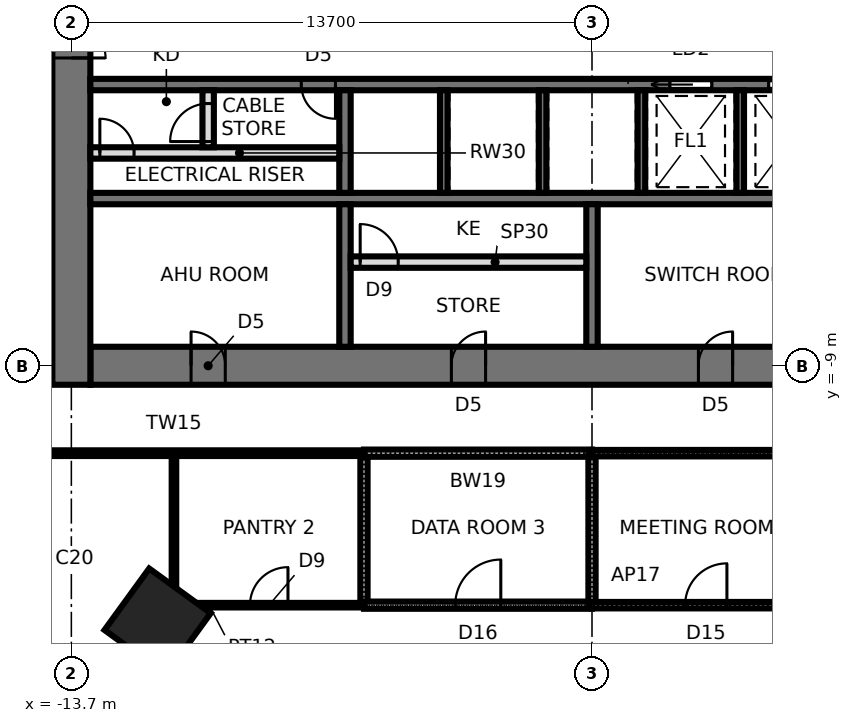
"""IFC4 building model, lengths in metres.
Left out: names, types, materials, properties, quantities, classifications, styles, units other than length and angle.
Written with IfcOpenShell. Run it as: python <this file> out.ifc"""

import sys

from ifc_helpers import new_model, si_unit, direction, frame, frame_2d, origin, origin_2d, place, context, subcontext, project, spatial, rectangle, extrude, element, fill, save


model = new_model("IFC4")
c1 = context("Model", 3, precision=1e-05, world=origin(), true_north=direction((0.0, 1.0)))
c2 = subcontext(c1, "Body", "Model", "MODEL_VIEW")
j1 = project(units=[si_unit("LENGTHUNIT", "METRE"), si_unit("PLANEANGLEUNIT", "RADIAN")], contexts=[c1])
p1 = place(None, origin())
s1 = spatial("IfcSite", under=j1, at=p1, CompositionType="ELEMENT")
p2 = place(p1, origin())
s2 = spatial("IfcBuilding", under=s1, at=p2, CompositionType="ELEMENT")
p3 = place(p2, frame((0.0, 0.0, 44.8)))
s3 = spatial("IfcBuildingStorey", under=s2, at=p3, CompositionType="ELEMENT", Elevation=44.8)
p4 = place(p3, frame((-11.43, -15.733, 0.0), z_axis=(0.0, 0.0, 1.0), x_axis=(-0.587785252292, -0.809016994375, 0.0)))
e1 = element("IfcColumn", 1, at=p4, inside=s3, PredefinedType="COLUMN", context=c2, shape_type="SweptSolid", body=[
    extrude(rectangle(XDim=2.0, YDim=2.0, at=origin_2d()), origin(), (0.0, 0.0, 1.0), 4.2),
])
p5 = place(p3, frame((-13.2, -9.0, 0.0), z_axis=(0.0, 0.0, 1.0), x_axis=(1.0, 0.0, 0.0)))
e2 = element("IfcWall", 2, at=p5, inside=s3, PredefinedType="SHEAR", context=c2, shape_type="SweptSolid", body=[
    extrude(rectangle(XDim=26.4, YDim=1.0, at=frame_2d((13.2, 0.0))), origin(), (0.0, 0.0, 1.0), 4.2),
])
p6 = place(p5, frame((2.65, 0.0, 0.0)))
e3 = element("IfcOpeningElement", 3, at=p6, cuts=e2, PredefinedType="OPENING", context=c2, shape_type="SweptSolid", body=[
    extrude(rectangle(XDim=0.9, YDim=2.1, at=frame_2d((0.45, 1.05))), frame((0.0, 0.51, 0.0), z_axis=(0.0, -1.0, 0.0), x_axis=(1.0, 0.0, 0.0)), (0.0, 0.0, 1.0), 1.02),
])
p7 = place(p5, frame((9.5, 0.0, 0.0)))
e4 = element("IfcOpeningElement", 4, at=p7, cuts=e2, PredefinedType="OPENING", context=c2, shape_type="SweptSolid", body=[
    extrude(rectangle(XDim=0.9, YDim=2.1, at=frame_2d((0.45, 1.05))), frame((0.0, 0.51, 0.0), z_axis=(0.0, -1.0, 0.0), x_axis=(1.0, 0.0, 0.0)), (0.0, 0.0, 1.0), 1.02),
])
p8 = place(p5, frame((16.0, 0.0, 0.0)))
e5 = element("IfcOpeningElement", 5, at=p8, cuts=e2, PredefinedType="OPENING", context=c2, shape_type="SweptSolid", body=[
    extrude(rectangle(XDim=0.9, YDim=2.1, at=frame_2d((0.45, 1.05))), frame((0.0, 0.51, 0.0), z_axis=(0.0, -1.0, 0.0), x_axis=(1.0, 0.0, 0.0)), (0.0, 0.0, 1.0), 1.02),
])
p9 = place(p5, frame((22.85, 0.0, 0.0)))
e6 = element("IfcOpeningElement", 6, at=p9, cuts=e2, PredefinedType="OPENING", context=c2, shape_type="SweptSolid", body=[
    extrude(rectangle(XDim=0.9, YDim=2.1, at=frame_2d((0.45, 1.05))), frame((0.0, 0.51, 0.0), z_axis=(0.0, -1.0, 0.0), x_axis=(1.0, 0.0, 0.0)), (0.0, 0.0, 1.0), 1.02),
])
p10 = place(p3, frame((-13.7, 9.5, 0.0), z_axis=(0.0, 0.0, 1.0), x_axis=(0.0, -1.0, 0.0)))
e7 = element("IfcWall", 7, at=p10, inside=s3, PredefinedType="SHEAR", context=c2, shape_type="SweptSolid", body=[
    extrude(rectangle(XDim=19.0, YDim=1.0, at=frame_2d((9.5, 0.0))), origin(), (0.0, 0.0, 1.0), 4.2),
])
p11 = place(p10, frame((8.6, 0.0, 0.0)))
e8 = element("IfcOpeningElement", 8, at=p11, cuts=e7, PredefinedType="OPENING", context=c2, shape_type="SweptSolid", body=[
    extrude(rectangle(XDim=1.8, YDim=2.4, at=frame_2d((0.9, 1.2))), frame((0.0, 0.51, 0.0), z_axis=(0.0, -1.0, 0.0), x_axis=(1.0, 0.0, 0.0)), (0.0, 0.0, 1.0), 1.02),
])
p12 = place(p3, frame((-13.2, -1.6, 0.0), z_axis=(0.0, 0.0, 1.0), x_axis=(1.0, 0.0, 0.0)))
e9 = element("IfcWall", 9, at=p12, inside=s3, PredefinedType="SHEAR", context=c2, shape_type="SweptSolid", body=[
    extrude(rectangle(XDim=26.4, YDim=0.3, at=frame_2d((13.2, 0.0))), origin(), (0.0, 0.0, 1.0), 4.2),
])
p13 = place(p12, frame((25.15, 0.0, 0.0)))
e10 = element("IfcOpeningElement", 10, at=p13, cuts=e9, PredefinedType="OPENING", context=c2, shape_type="SweptSolid", body=[
    extrude(rectangle(XDim=1.0, YDim=2.1, at=frame_2d((0.5, 1.05))), frame((0.0, 0.16, 0.0), z_axis=(0.0, -1.0, 0.0), x_axis=(1.0, 0.0, 0.0)), (0.0, 0.0, 1.0), 0.32),
])
p14 = place(p12, frame((15.25, 0.0, 0.0)))
e11 = element("IfcOpeningElement", 11, at=p14, cuts=e9, PredefinedType="OPENING", context=c2, shape_type="SweptSolid", body=[
    extrude(rectangle(XDim=1.1, YDim=2.3, at=frame_2d((0.55, 1.15))), frame((0.0, 0.16, 0.0), z_axis=(0.0, -1.0, 0.0), x_axis=(1.0, 0.0, 0.0)), (0.0, 0.0, 1.0), 0.32),
])
p15 = place(p12, frame((17.85, 0.0, 0.0)))
e12 = element("IfcOpeningElement", 12, at=p15, cuts=e9, PredefinedType="OPENING", context=c2, shape_type="SweptSolid", body=[
    extrude(rectangle(XDim=1.1, YDim=2.3, at=frame_2d((0.55, 1.15))), frame((0.0, 0.16, 0.0), z_axis=(0.0, -1.0, 0.0), x_axis=(1.0, 0.0, 0.0)), (0.0, 0.0, 1.0), 0.32),
])
p16 = place(p12, frame((5.55, 0.0, 0.0)))
e13 = element("IfcOpeningElement", 13, at=p16, cuts=e9, PredefinedType="OPENING", context=c2, shape_type="SweptSolid", body=[
    extrude(rectangle(XDim=0.9, YDim=2.1, at=frame_2d((0.45, 1.05))), frame((0.0, 0.16, 0.0), z_axis=(0.0, -1.0, 0.0), x_axis=(1.0, 0.0, 0.0)), (0.0, 0.0, 1.0), 0.32),
])
p17 = place(p3, frame((-13.2, -4.6, 0.0), z_axis=(0.0, 0.0, 1.0), x_axis=(1.0, 0.0, 0.0)))
e14 = element("IfcWall", 14, at=p17, inside=s3, PredefinedType="SHEAR", context=c2, shape_type="SweptSolid", body=[
    extrude(rectangle(XDim=26.4, YDim=0.3, at=frame_2d((13.2, 0.0))), origin(), (0.0, 0.0, 1.0), 4.2),
])
p18 = place(p3, frame((-6.5, -1.75, 0.0), z_axis=(0.0, 0.0, 1.0), x_axis=(0.0, -1.0, 0.0)))
e15 = element("IfcWall", 15, at=p18, inside=s3, PredefinedType="SHEAR", context=c2, shape_type="SweptSolid", body=[
    extrude(rectangle(XDim=2.7, YDim=0.3, at=frame_2d((1.35, 0.0))), origin(), (0.0, 0.0, 1.0), 4.2),
])
p19 = place(p3, frame((-6.5, -4.75, 0.0), z_axis=(0.0, 0.0, 1.0), x_axis=(0.0, -1.0, 0.0)))
e16 = element("IfcWall", 16, at=p19, inside=s3, PredefinedType="SHEAR", context=c2, shape_type="SweptSolid", body=[
    extrude(rectangle(XDim=3.75, YDim=0.3, at=frame_2d((1.875, 0.0))), origin(), (0.0, 0.0, 1.0), 4.2),
])
for number, where, z_axis, x_axis in (
    (17, (-3.9, -1.75, 0.0), (0.0, 0.0, 1.0), (0.0, -1.0, 0.0)),
    (18, (-1.3, -1.75, 0.0), (0.0, 0.0, 1.0), (0.0, -1.0, 0.0)),
    (19, (1.3, -1.75, 0.0), (0.0, 0.0, 1.0), (0.0, -1.0, 0.0)),
    (20, (3.9, -1.75, 0.0), (0.0, 0.0, 1.0), (0.0, -1.0, 0.0)),
):
    element("IfcWall", number, at=place(p3, frame(where, z_axis=z_axis, x_axis=x_axis)), inside=s3, PredefinedType="SHEAR", context=c2, shape_type="SweptSolid", body=[
        extrude(rectangle(XDim=2.7, YDim=0.2, at=frame_2d((1.35, 0.0))), origin(), (0.0, 0.0, 1.0), 4.2),
    ])
p20 = place(p3, frame((0.0, -4.75, 0.0), z_axis=(0.0, 0.0, 1.0), x_axis=(0.0, -1.0, 0.0)))
e21 = element("IfcWall", 21, at=p20, inside=s3, PredefinedType="SHEAR", context=c2, shape_type="SweptSolid", body=[
    extrude(rectangle(XDim=3.75, YDim=0.3, at=frame_2d((1.875, 0.0))), origin(), (0.0, 0.0, 1.0), 4.2),
])
p21 = place(p3, frame((-6.35, -6.272, 0.0), z_axis=(0.0, 0.0, 1.0), x_axis=(1.0, 0.0, 0.0)))
e22 = element("IfcWall", 22, at=p21, inside=s3, PredefinedType="PARTITIONING", context=c2, shape_type="SweptSolid", body=[
    extrude(rectangle(XDim=6.2, YDim=0.3, at=frame_2d((3.1, 0.0))), origin(), (0.0, 0.0, 1.0), 4.04),
])
p22 = place(p21, frame((0.25, 0.0, 0.0)))
e23 = element("IfcOpeningElement", 23, at=p22, cuts=e22, PredefinedType="OPENING", context=c2, shape_type="SweptSolid", body=[
    extrude(rectangle(XDim=1.0, YDim=2.4, at=frame_2d((0.5, 1.2))), frame((0.0, 0.16, 0.0), z_axis=(0.0, -1.0, 0.0), x_axis=(1.0, 0.0, 0.0)), (0.0, 0.0, 1.0), 0.32),
])
p23 = place(p3, frame((-13.2, -3.4, 0.0), z_axis=(0.0, 0.0, 1.0), x_axis=(1.0, 0.0, 0.0)))
e24 = element("IfcWall", 24, at=p23, inside=s3, PredefinedType="SOLIDWALL", context=c2, shape_type="SweptSolid", body=[
    extrude(rectangle(XDim=6.55, YDim=0.3, at=frame_2d((3.275, 0.0))), origin(), (0.0, 0.0, 1.0), 4.04),
])
p24 = place(p23, frame((0.25, 0.0, 0.0)))
e25 = element("IfcOpeningElement", 25, at=p24, cuts=e24, PredefinedType="OPENING", context=c2, shape_type="SweptSolid", body=[
    extrude(rectangle(XDim=0.9, YDim=2.1, at=frame_2d((0.45, 1.05))), frame((0.0, 0.16, 0.0), z_axis=(0.0, -1.0, 0.0), x_axis=(1.0, 0.0, 0.0)), (0.0, 0.0, 1.0), 0.32),
])
p25 = place(p3, frame((-10.1, -3.25, 0.0), z_axis=(0.0, 0.0, 1.0), x_axis=(0.0, 1.0, 0.0)))
e26 = element("IfcWall", 26, at=p25, inside=s3, PredefinedType="PARTITIONING", context=c2, shape_type="SweptSolid", body=[
    extrude(rectangle(XDim=1.5, YDim=0.3, at=frame_2d((0.75, 0.0))), origin(), (0.0, 0.0, 1.0), 4.04),
])
p26 = place(p25, frame((0.15, 0.0, 0.0)))
e27 = element("IfcOpeningElement", 27, at=p26, cuts=e26, PredefinedType="OPENING", context=c2, shape_type="SweptSolid", body=[
    extrude(rectangle(XDim=1.0, YDim=2.4, at=frame_2d((0.5, 1.2))), frame((0.0, 0.16, 0.0), z_axis=(0.0, -1.0, 0.0), x_axis=(1.0, 0.0, 0.0)), (0.0, 0.0, 1.0), 0.32),
])
p27 = place(p3, frame((-16.0, -11.3, 0.0), z_axis=(0.0, 0.0, 1.0), x_axis=(1.0, 0.0, 0.0)))
e28 = element("IfcWall", 28, at=p27, inside=s3, PredefinedType="PARTITIONING", context=c2, shape_type="SweptSolid", body=[
    extrude(rectangle(XDim=10.0, YDim=0.15, at=frame_2d((5.0, 0.0))), origin(), (0.0, 0.0, 1.0), 4.04),
])
p28 = place(p3, frame((-11.0, -11.3, 0.0), z_axis=(0.0, 0.0, 1.0), x_axis=(0.0, -1.0, 0.0)))
e29 = element("IfcWall", 29, at=p28, inside=s3, PredefinedType="PARTITIONING", context=c2, shape_type="SweptSolid", body=[
    extrude(rectangle(XDim=4.0, YDim=0.12, at=frame_2d((2.0, 0.0))), origin(), (0.0, 0.0, 1.0), 4.04),
])
p29 = place(p3, frame((-11.0, -15.3, 0.0), z_axis=(0.0, 0.0, 1.0), x_axis=(1.0, 0.0, 0.0)))
e30 = element("IfcWall", 30, at=p29, inside=s3, PredefinedType="PARTITIONING", context=c2, shape_type="SweptSolid", body=[
    extrude(rectangle(XDim=5.0, YDim=0.12, at=frame_2d((2.5, 0.0))), origin(), (0.0, 0.0, 1.0), 4.04),
])
p30 = place(p29, frame((2.0, 0.0, 0.0)))
e31 = element("IfcOpeningElement", 31, at=p30, cuts=e30, PredefinedType="OPENING", context=c2, shape_type="SweptSolid", body=[
    extrude(rectangle(XDim=1.0, YDim=2.4, at=frame_2d((0.5, 1.2))), frame((0.0, 0.07, 0.0), z_axis=(0.0, -1.0, 0.0), x_axis=(1.0, 0.0, 0.0)), (0.0, 0.0, 1.0), 0.14),
])
p31 = place(p3, frame((-6.0, -15.3, 0.0), z_axis=(0.0, 0.0, 1.0), x_axis=(0.0, 1.0, 0.0)))
e32 = element("IfcWall", 32, at=p31, inside=s3, PredefinedType="SOLIDWALL", context=c2, shape_type="SweptSolid", body=[
    extrude(rectangle(XDim=4.0, YDim=0.19, at=frame_2d((2.0, 0.0))), origin(), (0.0, 0.0, 1.0), 4.04),
])
p32 = place(p3, frame((0.0, -11.3, 0.0), z_axis=(0.0, 0.0, 1.0), x_axis=(-1.0, 0.0, 0.0)))
e33 = element("IfcWall", 33, at=p32, inside=s3, PredefinedType="SOLIDWALL", context=c2, shape_type="SweptSolid", body=[
    extrude(rectangle(XDim=6.0, YDim=0.19, at=frame_2d((3.0, 0.0))), origin(), (0.0, 0.0, 1.0), 4.04),
])
p33 = place(p3, frame((-6.0, -15.3, 0.0), z_axis=(0.0, 0.0, 1.0), x_axis=(1.0, 0.0, 0.0)))
e34 = element("IfcWall", 34, at=p33, inside=s3, PredefinedType="SOLIDWALL", context=c2, shape_type="SweptSolid", body=[
    extrude(rectangle(XDim=6.0, YDim=0.19, at=frame_2d((3.0, 0.0))), origin(), (0.0, 0.0, 1.0), 3.586),
])
p34 = place(p33, frame((2.4, 0.0, 0.0)))
e35 = element("IfcOpeningElement", 35, at=p34, cuts=e34, PredefinedType="OPENING", context=c2, shape_type="SweptSolid", body=[
    extrude(rectangle(XDim=1.2, YDim=2.1, at=frame_2d((0.6, 1.05))), frame((0.0, 0.105, 0.0), z_axis=(0.0, -1.0, 0.0), x_axis=(1.0, 0.0, 0.0)), (0.0, 0.0, 1.0), 0.21),
])
p35 = place(p3, frame((0.0, -11.3, 0.0), z_axis=(0.0, 0.0, 1.0), x_axis=(0.0, -1.0, 0.0)))
e36 = element("IfcWall", 36, at=p35, inside=s3, PredefinedType="SOLIDWALL", context=c2, shape_type="SweptSolid", body=[
    extrude(rectangle(XDim=4.0, YDim=0.19, at=frame_2d((2.0, 0.0))), origin(), (0.0, 0.0, 1.0), 2.84),
])
p36 = place(p3, frame((0.0, -15.3, 0.0), z_axis=(0.0, 0.0, 1.0), x_axis=(1.0, 0.0, 0.0)))
e37 = element("IfcWall", 37, at=p36, inside=s3, PredefinedType="PARTITIONING", context=c2, shape_type="SweptSolid", body=[
    extrude(rectangle(XDim=6.0, YDim=0.17, at=frame_2d((3.0, 0.0))), origin(), (0.0, 0.0, 1.0), 3.586),
])
p37 = place(p36, frame((2.45, 0.0, 0.0)))
e38 = element("IfcOpeningElement", 38, at=p37, cuts=e37, PredefinedType="OPENING", context=c2, shape_type="SweptSolid", body=[
    extrude(rectangle(XDim=1.1, YDim=2.4, at=frame_2d((0.55, 1.2))), frame((0.0, 0.095, 0.0), z_axis=(0.0, -1.0, 0.0), x_axis=(1.0, 0.0, 0.0)), (0.0, 0.0, 1.0), 0.19),
])
p38 = place(p3, frame((6.0, -11.3, 0.0), z_axis=(0.0, 0.0, 1.0), x_axis=(-1.0, 0.0, 0.0)))
e39 = element("IfcWall", 39, at=p38, inside=s3, PredefinedType="PARTITIONING", context=c2, shape_type="SweptSolid", body=[
    extrude(rectangle(XDim=6.0, YDim=0.17, at=frame_2d((3.0, 0.0))), origin(), (0.0, 0.0, 1.0), 4.04),
])
p39 = place(p11, origin())
e40 = element("IfcDoor", 40, at=p39, inside=s3, OperationType="DOUBLE_DOOR_SINGLE_SWING", PredefinedType="DOOR", context=c2, shape_type="SweptSolid", body=[
    extrude(rectangle(XDim=1.72, YDim=2.36, at=frame_2d((0.9, 1.18))), frame((0.0, 0.025, 0.0), z_axis=(0.0, -1.0, 0.0), x_axis=(1.0, 0.0, 0.0)), (0.0, 0.0, 1.0), 0.05),
    extrude(rectangle(XDim=0.04, YDim=2.4, at=frame_2d((0.02, 1.2))), frame((0.0, 0.25, 0.0), z_axis=(0.0, -1.0, 0.0), x_axis=(1.0, 0.0, 0.0)), (0.0, 0.0, 1.0), 0.5),
    extrude(rectangle(XDim=0.04, YDim=2.4, at=frame_2d((1.78, 1.2))), frame((0.0, 0.25, 0.0), z_axis=(0.0, -1.0, 0.0), x_axis=(1.0, 0.0, 0.0)), (0.0, 0.0, 1.0), 0.5),
    extrude(rectangle(XDim=1.72, YDim=0.04, at=frame_2d((0.9, 2.38))), frame((0.0, 0.25, 0.0), z_axis=(0.0, -1.0, 0.0), x_axis=(1.0, 0.0, 0.0)), (0.0, 0.0, 1.0), 0.5),
])
fill(e8, e40)
p40 = place(p14, frame((1.1, 0.0, 0.0), z_axis=(0.0, 0.0, 1.0), x_axis=(-1.0, 0.0, 0.0)))
e41 = element("IfcDoor", 41, at=p40, inside=s3, OperationType="SLIDING_TO_RIGHT", PredefinedType="DOOR", context=c2, shape_type="SweptSolid", body=[
    extrude(rectangle(XDim=1.1, YDim=2.3, at=frame_2d((0.55, 1.15))), frame((0.0, 0.025, 0.0), z_axis=(0.0, -1.0, 0.0), x_axis=(1.0, 0.0, 0.0)), (0.0, 0.0, 1.0), 0.05),
])
fill(e11, e41)
p41 = place(p15, frame((1.1, 0.0, 0.0), z_axis=(0.0, 0.0, 1.0), x_axis=(-1.0, 0.0, 0.0)))
e42 = element("IfcDoor", 42, at=p41, inside=s3, OperationType="SLIDING_TO_LEFT", PredefinedType="DOOR", context=c2, shape_type="SweptSolid", body=[
    extrude(rectangle(XDim=1.1, YDim=2.3, at=frame_2d((0.55, 1.15))), frame((0.0, 0.025, 0.0), z_axis=(0.0, -1.0, 0.0), x_axis=(1.0, 0.0, 0.0)), (0.0, 0.0, 1.0), 0.05),
])
fill(e12, e42)
p42 = place(p16, frame((0.9, 0.0, 0.0), z_axis=(0.0, 0.0, 1.0), x_axis=(-1.0, 0.0, 0.0)))
e43 = element("IfcDoor", 43, at=p42, inside=s3, OperationType="SINGLE_SWING_LEFT", PredefinedType="DOOR", context=c2, shape_type="SweptSolid", body=[
    extrude(rectangle(XDim=0.9, YDim=2.1, at=frame_2d((0.45, 1.05))), frame((0.0, 0.025, 0.0), z_axis=(0.0, -1.0, 0.0), x_axis=(1.0, 0.0, 0.0)), (0.0, 0.0, 1.0), 0.05),
])
fill(e13, e43)
p43 = place(p6, origin())
e44 = element("IfcDoor", 44, at=p43, inside=s3, OperationType="SINGLE_SWING_LEFT", PredefinedType="DOOR", context=c2, shape_type="SweptSolid", body=[
    extrude(rectangle(XDim=0.82, YDim=2.06, at=frame_2d((0.45, 1.03))), frame((0.0, 0.025, 0.0), z_axis=(0.0, -1.0, 0.0), x_axis=(1.0, 0.0, 0.0)), (0.0, 0.0, 1.0), 0.05),
    extrude(rectangle(XDim=0.04, YDim=2.1, at=frame_2d((0.02, 1.05))), frame((0.0, 0.25, 0.0), z_axis=(0.0, -1.0, 0.0), x_axis=(1.0, 0.0, 0.0)), (0.0, 0.0, 1.0), 0.5),
    extrude(rectangle(XDim=0.04, YDim=2.1, at=frame_2d((0.88, 1.05))), frame((0.0, 0.25, 0.0), z_axis=(0.0, -1.0, 0.0), x_axis=(1.0, 0.0, 0.0)), (0.0, 0.0, 1.0), 0.5),
    extrude(rectangle(XDim=0.82, YDim=0.04, at=frame_2d((0.45, 2.08))), frame((0.0, 0.25, 0.0), z_axis=(0.0, -1.0, 0.0), x_axis=(1.0, 0.0, 0.0)), (0.0, 0.0, 1.0), 0.5),
])
fill(e3, e44)
p44 = place(p7, origin())
e45 = element("IfcDoor", 45, at=p44, inside=s3, OperationType="SINGLE_SWING_RIGHT", PredefinedType="DOOR", context=c2, shape_type="SweptSolid", body=[
    extrude(rectangle(XDim=0.82, YDim=2.06, at=frame_2d((0.45, 1.03))), frame((0.0, 0.025, 0.0), z_axis=(0.0, -1.0, 0.0), x_axis=(1.0, 0.0, 0.0)), (0.0, 0.0, 1.0), 0.05),
    extrude(rectangle(XDim=0.04, YDim=2.1, at=frame_2d((0.02, 1.05))), frame((0.0, 0.25, 0.0), z_axis=(0.0, -1.0, 0.0), x_axis=(1.0, 0.0, 0.0)), (0.0, 0.0, 1.0), 0.5),
    extrude(rectangle(XDim=0.04, YDim=2.1, at=frame_2d((0.88, 1.05))), frame((0.0, 0.25, 0.0), z_axis=(0.0, -1.0, 0.0), x_axis=(1.0, 0.0, 0.0)), (0.0, 0.0, 1.0), 0.5),
    extrude(rectangle(XDim=0.82, YDim=0.04, at=frame_2d((0.45, 2.08))), frame((0.0, 0.25, 0.0), z_axis=(0.0, -1.0, 0.0), x_axis=(1.0, 0.0, 0.0)), (0.0, 0.0, 1.0), 0.5),
])
fill(e4, e45)
p45 = place(p8, origin())
e46 = element("IfcDoor", 46, at=p45, inside=s3, OperationType="SINGLE_SWING_RIGHT", PredefinedType="DOOR", context=c2, shape_type="SweptSolid", body=[
    extrude(rectangle(XDim=0.82, YDim=2.06, at=frame_2d((0.45, 1.03))), frame((0.0, 0.025, 0.0), z_axis=(0.0, -1.0, 0.0), x_axis=(1.0, 0.0, 0.0)), (0.0, 0.0, 1.0), 0.05),
    extrude(rectangle(XDim=0.04, YDim=2.1, at=frame_2d((0.02, 1.05))), frame((0.0, 0.25, 0.0), z_axis=(0.0, -1.0, 0.0), x_axis=(1.0, 0.0, 0.0)), (0.0, 0.0, 1.0), 0.5),
    extrude(rectangle(XDim=0.04, YDim=2.1, at=frame_2d((0.88, 1.05))), frame((0.0, 0.25, 0.0), z_axis=(0.0, -1.0, 0.0), x_axis=(1.0, 0.0, 0.0)), (0.0, 0.0, 1.0), 0.5),
    extrude(rectangle(XDim=0.82, YDim=0.04, at=frame_2d((0.45, 2.08))), frame((0.0, 0.25, 0.0), z_axis=(0.0, -1.0, 0.0), x_axis=(1.0, 0.0, 0.0)), (0.0, 0.0, 1.0), 0.5),
])
fill(e5, e46)
p46 = place(p22, origin())
e47 = element("IfcDoor", 47, at=p46, inside=s3, OperationType="SINGLE_SWING_LEFT", PredefinedType="DOOR", context=c2, shape_type="SweptSolid", body=[
    extrude(rectangle(XDim=1.0, YDim=2.4, at=frame_2d((0.5, 1.2))), frame((0.0, 0.025, 0.0), z_axis=(0.0, -1.0, 0.0), x_axis=(1.0, 0.0, 0.0)), (0.0, 0.0, 1.0), 0.05),
])
fill(e23, e47)
p47 = place(p24, origin())
e48 = element("IfcDoor", 48, at=p47, inside=s3, OperationType="SINGLE_SWING_LEFT", PredefinedType="DOOR", context=c2, shape_type="SweptSolid", body=[
    extrude(rectangle(XDim=0.9, YDim=2.1, at=frame_2d((0.45, 1.05))), frame((0.0, 0.025, 0.0), z_axis=(0.0, -1.0, 0.0), x_axis=(1.0, 0.0, 0.0)), (0.0, 0.0, 1.0), 0.05),
])
fill(e25, e48)
p48 = place(p26, origin())
e49 = element("IfcDoor", 49, at=p48, inside=s3, OperationType="SINGLE_SWING_LEFT", PredefinedType="DOOR", context=c2, shape_type="SweptSolid", body=[
    extrude(rectangle(XDim=1.0, YDim=2.4, at=frame_2d((0.5, 1.2))), frame((0.0, 0.025, 0.0), z_axis=(0.0, -1.0, 0.0), x_axis=(1.0, 0.0, 0.0)), (0.0, 0.0, 1.0), 0.05),
])
fill(e27, e49)
p49 = place(p34, origin())
e50 = element("IfcDoor", 50, at=p49, inside=s3, OperationType="SINGLE_SWING_RIGHT", PredefinedType="DOOR", context=c2, shape_type="SweptSolid", body=[
    extrude(rectangle(XDim=1.2, YDim=2.1, at=frame_2d((0.6, 1.05))), frame((0.0, 0.025, 0.0), z_axis=(0.0, -1.0, 0.0), x_axis=(1.0, 0.0, 0.0)), (0.0, 0.0, 1.0), 0.05),
])
fill(e35, e50)
p50 = place(p37, origin())
e51 = element("IfcDoor", 51, at=p50, inside=s3, OperationType="SINGLE_SWING_RIGHT", PredefinedType="DOOR", context=c2, shape_type="SweptSolid", body=[
    extrude(rectangle(XDim=1.1, YDim=2.4, at=frame_2d((0.55, 1.2))), frame((0.0, 0.025, 0.0), z_axis=(0.0, -1.0, 0.0), x_axis=(1.0, 0.0, 0.0)), (0.0, 0.0, 1.0), 0.05),
])
fill(e38, e51)
p51 = place(p30, origin())
e52 = element("IfcDoor", 52, at=p51, inside=s3, OperationType="SINGLE_SWING_RIGHT", PredefinedType="DOOR", context=c2, shape_type="SweptSolid", body=[
    extrude(rectangle(XDim=1.0, YDim=2.4, at=frame_2d((0.5, 1.2))), frame((0.0, 0.025, 0.0), z_axis=(0.0, -1.0, 0.0), x_axis=(1.0, 0.0, 0.0)), (0.0, 0.0, 1.0), 0.05),
])
fill(e31, e52)
save(model, sys.argv[1])
